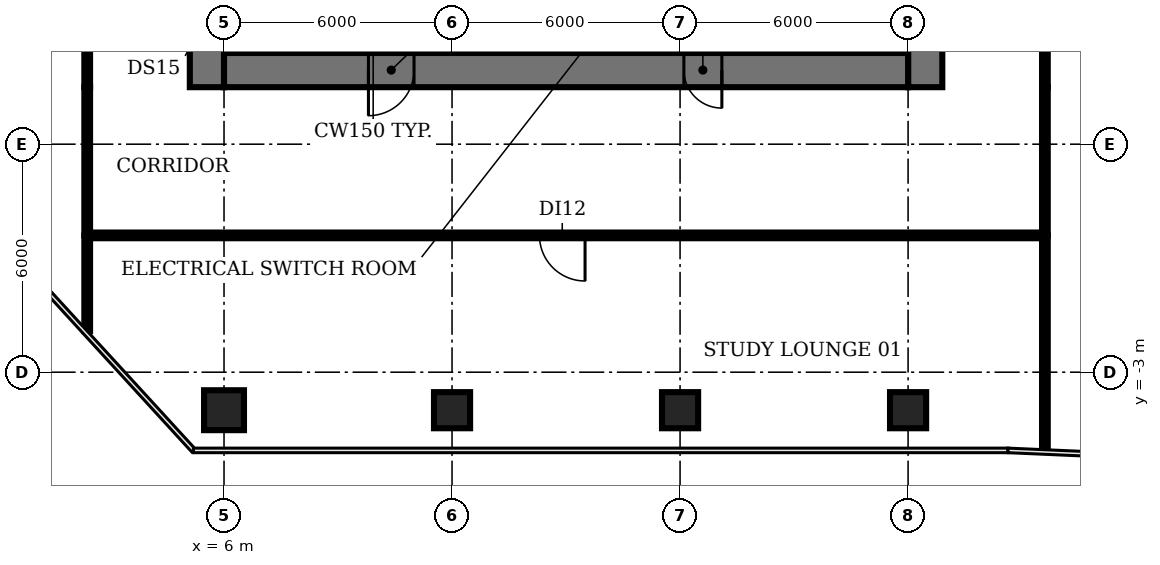
"""IFC4 building model, lengths in metres.
Left out: names, types, materials, properties, quantities, classifications, styles, units other than length and angle.
Written with IfcOpenShell. Run it as: python <this file> out.ifc"""

import sys

from ifc_helpers import new_model, si_unit, direction, frame, frame_2d, origin, origin_2d, place, context, subcontext, project, spatial, rectangle, circle, extrude, element, fill, save


model = new_model("IFC4")
c1 = context("Model", 3, precision=1e-05, world=origin(), true_north=direction((0.0, 1.0)))
c2 = subcontext(c1, "Body", "Model", "MODEL_VIEW")
j1 = project(units=[si_unit("LENGTHUNIT", "METRE"), si_unit("PLANEANGLEUNIT", "RADIAN")], contexts=[c1])
p1 = place(None, origin())
s1 = spatial("IfcSite", under=j1, at=p1, CompositionType="ELEMENT")
p2 = place(p1, origin())
s2 = spatial("IfcBuilding", under=s1, at=p2, CompositionType="ELEMENT")
p3 = place(p2, frame((0.0, 0.0, 41.6)))
s3 = spatial("IfcBuildingStorey", under=s2, at=p3, CompositionType="ELEMENT", Elevation=41.6)
p4 = place(p3, frame((6.0, -4.0, 0.0), z_axis=(0.0, 0.0, 1.0), x_axis=(1.0, 0.0, 0.0)))
e1 = element("IfcColumn", 1, at=p4, inside=s3, PredefinedType="COLUMN", context=c2, shape_type="SweptSolid", body=[
    extrude(circle(Radius=0.525, at=origin_2d()), origin(), (0.0, 0.0, 1.0), 3.85),
])
for number, where, z_axis, x_axis in (
    (2, (12.0, -4.0, 0.0), (0.0, 0.0, 1.0), (1.0, 0.0, 0.0)),
    (3, (18.0, -4.0, 0.0), (0.0, 0.0, 1.0), (1.0, 0.0, 0.0)),
    (4, (24.0, -4.0, 0.0), (0.0, 0.0, 1.0), (1.0, 0.0, 0.0)),
):
    element("IfcColumn", number, at=place(p3, frame(where, z_axis=z_axis, x_axis=x_axis)), inside=s3, PredefinedType="COLUMN", context=c2, shape_type="SweptSolid", body=[
        extrude(rectangle(XDim=0.95, YDim=0.95, at=origin_2d()), origin(), (0.0, 0.0, 1.0), 3.85),
    ])
p5 = place(p3, frame((9.275, 11.825, 0.0), z_axis=(0.0, 0.0, 1.0), x_axis=(0.0, -1.0, 0.0)))
e5 = element("IfcWall", 5, at=p5, inside=s3, PredefinedType="SHEAR", context=c2, shape_type="SweptSolid", body=[
    extrude(rectangle(XDim=6.425, YDim=0.25, at=frame_2d((3.212, 0.0))), origin(), (0.0, 0.0, 1.0), 3.85),
])
p6 = place(p5, frame((5.075, 0.0, 0.0)))
e6 = element("IfcOpeningElement", 6, at=p6, cuts=e5, PredefinedType="OPENING", context=c2, shape_type="SweptSolid", body=[
    extrude(rectangle(XDim=1.0, YDim=2.1, at=frame_2d((0.5, 1.05))), frame((0.0, 0.135, 0.0), z_axis=(0.0, -1.0, 0.0), x_axis=(1.0, 0.0, 0.0)), (0.0, 0.0, 1.0), 0.27),
])
p7 = place(p3, frame((13.5, 5.4, 0.0), z_axis=(0.0, 0.0, 1.0), x_axis=(0.0, 1.0, 0.0)))
e7 = element("IfcWall", 7, at=p7, inside=s3, PredefinedType="SHEAR", context=c2, shape_type="SweptSolid", body=[
    extrude(rectangle(XDim=8.2, YDim=0.2, at=frame_2d((4.1, 0.0))), origin(), (0.0, 0.0, 1.0), 3.85),
])
p8 = place(p7, frame((0.75, 0.0, 0.0)))
e8 = element("IfcOpeningElement", 8, at=p8, cuts=e7, PredefinedType="OPENING", context=c2, shape_type="SweptSolid", body=[
    extrude(rectangle(XDim=1.1, YDim=2.1, at=frame_2d((0.55, 1.05))), frame((0.0, 0.11, 0.0), z_axis=(0.0, -1.0, 0.0), x_axis=(1.0, 0.0, 0.0)), (0.0, 0.0, 1.0), 0.22),
])
p9 = place(p7, frame((3.55, 0.0, 0.0)))
e9 = element("IfcOpeningElement", 9, at=p9, cuts=e7, PredefinedType="OPENING", context=c2, shape_type="SweptSolid", body=[
    extrude(rectangle(XDim=1.1, YDim=2.1, at=frame_2d((0.55, 1.05))), frame((0.0, 0.11, 0.0), z_axis=(0.0, -1.0, 0.0), x_axis=(1.0, 0.0, 0.0)), (0.0, 0.0, 1.0), 0.22),
])
p10 = place(p7, frame((6.35, 0.0, 0.0)))
e10 = element("IfcOpeningElement", 10, at=p10, cuts=e7, PredefinedType="OPENING", context=c2, shape_type="SweptSolid", body=[
    extrude(rectangle(XDim=1.1, YDim=2.1, at=frame_2d((0.55, 1.05))), frame((0.0, 0.11, 0.0), z_axis=(0.0, -1.0, 0.0), x_axis=(1.0, 0.0, 0.0)), (0.0, 0.0, 1.0), 0.22),
])
p11 = place(p3, frame((16.5, 5.4, 0.0), z_axis=(0.0, 0.0, 1.0), x_axis=(0.0, 1.0, 0.0)))
e11 = element("IfcWall", 11, at=p11, inside=s3, PredefinedType="SHEAR", context=c2, shape_type="SweptSolid", body=[
    extrude(rectangle(XDim=8.2, YDim=0.2, at=frame_2d((4.1, 0.0))), origin(), (0.0, 0.0, 1.0), 3.85),
])
p12 = place(p3, frame((20.725, 5.4, 0.0), z_axis=(0.0, 0.0, 1.0), x_axis=(0.0, 1.0, 0.0)))
e12 = element("IfcWall", 12, at=p12, inside=s3, PredefinedType="SHEAR", context=c2, shape_type="SweptSolid", body=[
    extrude(rectangle(XDim=6.3, YDim=0.25, at=frame_2d((3.15, 0.0))), origin(), (0.0, 0.0, 1.0), 3.85),
])
p13 = place(p3, frame((5.55, 4.5, 0.0), z_axis=(0.0, 0.0, 1.0), x_axis=(0.0, 1.0, 0.0)))
e13 = element("IfcWall", 13, at=p13, inside=s3, PredefinedType="SHEAR", context=c2, shape_type="SweptSolid", body=[
    extrude(rectangle(XDim=21.2, YDim=0.9, at=frame_2d((10.6, 0.0))), origin(), (0.0, 0.0, 1.0), 3.85),
])
p14 = place(p13, frame((1.15, 0.0, 0.0)))
e14 = element("IfcOpeningElement", 14, at=p14, cuts=e13, PredefinedType="OPENING", context=c2, shape_type="SweptSolid", body=[
    extrude(rectangle(XDim=1.5, YDim=2.1, at=frame_2d((0.75, 1.05))), frame((0.0, 0.46, 0.0), z_axis=(0.0, -1.0, 0.0), x_axis=(1.0, 0.0, 0.0)), (0.0, 0.0, 1.0), 0.92),
])
p15 = place(p13, frame((7.6, 0.0, 0.0)))
e15 = element("IfcOpeningElement", 15, at=p15, cuts=e13, PredefinedType="OPENING", context=c2, shape_type="SweptSolid", body=[
    extrude(rectangle(XDim=1.2, YDim=2.1, at=frame_2d((0.6, 1.05))), frame((0.0, 0.46, 0.0), z_axis=(0.0, -1.0, 0.0), x_axis=(1.0, 0.0, 0.0)), (0.0, 0.0, 1.0), 0.92),
])
p16 = place(p13, frame((14.15, 0.0, 0.0)))
e16 = element("IfcOpeningElement", 16, at=p16, cuts=e13, PredefinedType="OPENING", context=c2, shape_type="SweptSolid", body=[
    extrude(rectangle(XDim=1.2, YDim=2.1, at=frame_2d((0.6, 1.05))), frame((0.0, 0.46, 0.0), z_axis=(0.0, -1.0, 0.0), x_axis=(1.0, 0.0, 0.0)), (0.0, 0.0, 1.0), 0.92),
])
p17 = place(p3, frame((24.45, 25.7, 0.0), z_axis=(0.0, 0.0, 1.0), x_axis=(0.0, -1.0, 0.0)))
e17 = element("IfcWall", 17, at=p17, inside=s3, PredefinedType="SHEAR", context=c2, shape_type="SweptSolid", body=[
    extrude(rectangle(XDim=21.2, YDim=0.9, at=frame_2d((10.6, 0.0))), origin(), (0.0, 0.0, 1.0), 3.85),
])
p18 = place(p17, frame((18.55, 0.0, 0.0)))
e18 = element("IfcOpeningElement", 18, at=p18, cuts=e17, PredefinedType="OPENING", context=c2, shape_type="SweptSolid", body=[
    extrude(rectangle(XDim=1.5, YDim=2.1, at=frame_2d((0.75, 1.05))), frame((0.0, 0.46, 0.0), z_axis=(0.0, -1.0, 0.0), x_axis=(1.0, 0.0, 0.0)), (0.0, 0.0, 1.0), 0.92),
])
p19 = place(p17, frame((12.45, 0.0, 0.0)))
e19 = element("IfcOpeningElement", 19, at=p19, cuts=e17, PredefinedType="OPENING", context=c2, shape_type="SweptSolid", body=[
    extrude(rectangle(XDim=0.9, YDim=2.1, at=frame_2d((0.45, 1.05))), frame((0.0, 0.46, 0.0), z_axis=(0.0, -1.0, 0.0), x_axis=(1.0, 0.0, 0.0)), (0.0, 0.0, 1.0), 0.92),
])
p20 = place(p17, frame((6.45, 0.0, 0.0)))
e20 = element("IfcOpeningElement", 20, at=p20, cuts=e17, PredefinedType="OPENING", context=c2, shape_type="SweptSolid", body=[
    extrude(rectangle(XDim=2.0, YDim=2.1, at=frame_2d((1.0, 1.05))), frame((0.0, 0.46, 0.0), z_axis=(0.0, -1.0, 0.0), x_axis=(1.0, 0.0, 0.0)), (0.0, 0.0, 1.0), 0.92),
])
p21 = place(p3, frame((24.0, 4.95, 0.0), z_axis=(0.0, 0.0, 1.0), x_axis=(-1.0, 0.0, 0.0)))
e21 = element("IfcWall", 21, at=p21, inside=s3, PredefinedType="SHEAR", context=c2, shape_type="SweptSolid", body=[
    extrude(rectangle(XDim=18.0, YDim=0.9, at=frame_2d((9.0, 0.0))), origin(), (0.0, 0.0, 1.0), 3.85),
])
p22 = place(p21, frame((13.0, 0.0, 0.0)))
e22 = element("IfcOpeningElement", 22, at=p22, cuts=e21, PredefinedType="OPENING", context=c2, shape_type="SweptSolid", body=[
    extrude(rectangle(XDim=1.2, YDim=2.1, at=frame_2d((0.6, 1.05))), frame((0.0, 0.46, 0.0), z_axis=(0.0, -1.0, 0.0), x_axis=(1.0, 0.0, 0.0)), (0.0, 0.0, 1.0), 0.92),
])
p23 = place(p21, frame((4.9, 0.0, 0.0)))
e23 = element("IfcOpeningElement", 23, at=p23, cuts=e21, PredefinedType="OPENING", context=c2, shape_type="SweptSolid", body=[
    extrude(rectangle(XDim=1.0, YDim=2.1, at=frame_2d((0.5, 1.05))), frame((0.0, 0.46, 0.0), z_axis=(0.0, -1.0, 0.0), x_axis=(1.0, 0.0, 0.0)), (0.0, 0.0, 1.0), 0.92),
])
p24 = place(p3, frame((2.4, -1.918, 0.0), z_axis=(0.0, 0.0, 1.0), x_axis=(0.0, 1.0, 0.0)))
e24 = element("IfcWall", 24, at=p24, inside=s3, PredefinedType="PARTITIONING", context=c2, shape_type="SweptSolid", body=[
    extrude(rectangle(XDim=2.518, YDim=0.15, at=frame_2d((1.259, 0.0))), origin(), (0.0, 0.0, 1.0), 2.83),
])
p25 = place(p3, frame((2.4, 0.6, 0.0), z_axis=(0.0, 0.0, 1.0), x_axis=(0.0, 1.0, 0.0)))
e25 = element("IfcWall", 25, at=p25, inside=s3, PredefinedType="PARTITIONING", context=c2, shape_type="SweptSolid", body=[
    extrude(rectangle(XDim=3.9, YDim=0.15, at=frame_2d((1.95, 0.0))), origin(), (0.0, 0.0, 1.0), 2.83),
])
p26 = place(p3, frame((2.4, 4.5, 0.0), z_axis=(0.0, 0.0, 1.0), x_axis=(0.0, 1.0, 0.0)))
e26 = element("IfcWall", 26, at=p26, inside=s3, PredefinedType="PARTITIONING", context=c2, shape_type="SweptSolid", body=[
    extrude(rectangle(XDim=21.2, YDim=0.15, at=frame_2d((10.6, 0.0))), origin(), (0.0, 0.0, 1.0), 2.83),
])
p27 = place(p26, frame((10.8, 0.0, 0.0)))
e27 = element("IfcOpeningElement", 27, at=p27, cuts=e26, PredefinedType="OPENING", context=c2, shape_type="SweptSolid", body=[
    extrude(rectangle(XDim=1.2, YDim=2.1, at=frame_2d((0.6, 1.05))), frame((0.0, 0.085, 0.0), z_axis=(0.0, -1.0, 0.0), x_axis=(1.0, 0.0, 0.0)), (0.0, 0.0, 1.0), 0.17),
])
p28 = place(p3, frame((27.6, -5.05, 0.0), z_axis=(0.0, 0.0, 1.0), x_axis=(0.0, 1.0, 0.0)))
e28 = element("IfcWall", 28, at=p28, inside=s3, PredefinedType="PARTITIONING", context=c2, shape_type="SweptSolid", body=[
    extrude(rectangle(XDim=5.65, YDim=0.15, at=frame_2d((2.825, 0.0))), origin(), (0.0, 0.0, 1.0), 2.83),
])
p29 = place(p3, frame((27.6, 0.6, 0.0), z_axis=(0.0, 0.0, 1.0), x_axis=(-1.0, 0.0, 0.0)))
e29 = element("IfcWall", 29, at=p29, inside=s3, PredefinedType="PARTITIONING", context=c2, shape_type="SweptSolid", body=[
    extrude(rectangle(XDim=25.2, YDim=0.15, at=frame_2d((12.6, 0.0))), origin(), (0.0, 0.0, 1.0), 2.83),
])
p30 = place(p29, frame((12.1, 0.0, 0.0)))
e30 = element("IfcOpeningElement", 30, at=p30, cuts=e29, PredefinedType="OPENING", context=c2, shape_type="SweptSolid", body=[
    extrude(rectangle(XDim=1.2, YDim=2.1, at=frame_2d((0.6, 1.05))), frame((0.0, 0.085, 0.0), z_axis=(0.0, -1.0, 0.0), x_axis=(1.0, 0.0, 0.0)), (0.0, 0.0, 1.0), 0.17),
])
p31 = place(p3, frame((27.6, 0.6, 0.0), z_axis=(0.0, 0.0, 1.0), x_axis=(0.0, 1.0, 0.0)))
e31 = element("IfcWall", 31, at=p31, inside=s3, PredefinedType="PARTITIONING", context=c2, shape_type="SweptSolid", body=[
    extrude(rectangle(XDim=3.9, YDim=0.15, at=frame_2d((1.95, 0.0))), origin(), (0.0, 0.0, 1.0), 2.83),
])
p32 = place(p3, frame((27.6, 15.0, 0.0), z_axis=(0.0, 0.0, 1.0), x_axis=(0.0, -1.0, 0.0)))
e32 = element("IfcWall", 32, at=p32, inside=s3, PredefinedType="PARTITIONING", context=c2, shape_type="SweptSolid", body=[
    extrude(rectangle(XDim=10.5, YDim=0.15, at=frame_2d((5.25, 0.0))), origin(), (0.0, 0.0, 1.0), 2.83),
])
p33 = place(p32, frame((4.8, 0.0, 0.0)))
e33 = element("IfcOpeningElement", 33, at=p33, cuts=e32, PredefinedType="OPENING", context=c2, shape_type="SweptSolid", body=[
    extrude(rectangle(XDim=1.0, YDim=2.1, at=frame_2d((0.5, 1.05))), frame((0.0, 0.085, 0.0), z_axis=(0.0, -1.0, 0.0), x_axis=(1.0, 0.0, 0.0)), (0.0, 0.0, 1.0), 0.17),
])
p34 = place(p22, origin())
e34 = element("IfcDoor", 34, at=p34, inside=s3, OperationType="SINGLE_SWING_RIGHT", PredefinedType="DOOR", context=c2, shape_type="SweptSolid", body=[
    extrude(rectangle(XDim=1.2, YDim=2.1, at=frame_2d((0.6, 1.05))), frame((0.0, 0.025, 0.0), z_axis=(0.0, -1.0, 0.0), x_axis=(1.0, 0.0, 0.0)), (0.0, 0.0, 1.0), 0.05),
])
fill(e22, e34)
p35 = place(p23, origin())
e35 = element("IfcDoor", 35, at=p35, inside=s3, OperationType="SINGLE_SWING_LEFT", PredefinedType="DOOR", context=c2, shape_type="SweptSolid", body=[
    extrude(rectangle(XDim=1.0, YDim=2.1, at=frame_2d((0.5, 1.05))), frame((0.0, -0.39, 0.0), z_axis=(0.0, -1.0, 0.0), x_axis=(1.0, 0.0, 0.0)), (0.0, 0.0, 1.0), 0.05),
])
fill(e23, e35)
p36 = place(p30, origin())
e36 = element("IfcDoor", 36, at=p36, inside=s3, OperationType="SINGLE_SWING_LEFT", PredefinedType="DOOR", context=c2, shape_type="SweptSolid", body=[
    extrude(rectangle(XDim=1.2, YDim=2.1, at=frame_2d((0.6, 1.05))), frame((0.0, 0.025, 0.0), z_axis=(0.0, -1.0, 0.0), x_axis=(1.0, 0.0, 0.0)), (0.0, 0.0, 1.0), 0.05),
])
fill(e30, e36)
save(model, sys.argv[1])
